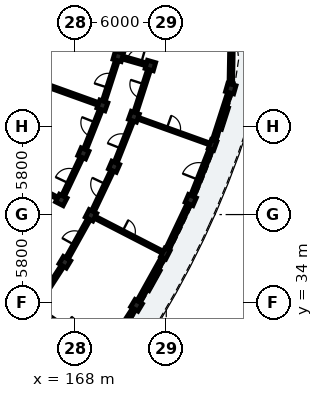
"""IFC4 building model, lengths in metres.
Left out: names, types, materials, properties, quantities, classifications, styles, units other than length and angle.
Written with IfcOpenShell. Run it as: python <this file> out.ifc"""

import sys

from ifc_helpers import new_model, si_unit, direction, frame, frame_2d, origin, origin_2d, place, context, subcontext, project, spatial, rectangle, extrude, element, fill, save


model = new_model("IFC4")
c1 = context("Model", 3, precision=1e-05, world=origin(), true_north=direction((0.0, 1.0)))
c2 = subcontext(c1, "Body", "Model", "MODEL_VIEW")
j1 = project(units=[si_unit("LENGTHUNIT", "METRE"), si_unit("PLANEANGLEUNIT", "RADIAN")], contexts=[c1])
p1 = place(None, origin())
s1 = spatial("IfcSite", under=j1, at=p1, CompositionType="ELEMENT")
p2 = place(p1, origin())
s2 = spatial("IfcBuilding", under=s1, at=p2, CompositionType="ELEMENT")
p3 = place(p2, frame((0.0, 0.0, 15.56)))
s3 = spatial("IfcBuildingStorey", under=s2, at=p3, CompositionType="ELEMENT", Elevation=15.56)
for number, where, z_axis, x_axis in (
    (1, (167.33, 36.662, 0.0), (0.0, 0.0, 1.0), (0.857, -0.515, 0.0)),
    (2, (172.044, 33.83, 0.0), (0.0, 0.0, 1.0), (0.857, -0.515, 0.0)),
    (3, (167.095, 40.759, 0.0), (0.0, 0.0, 1.0), (0.889, -0.458, 0.0)),
    (4, (169.051, 39.752, 0.0), (0.0, 0.0, 1.0), (0.889, -0.458, 0.0)),
):
    element("IfcColumn", number, at=place(p3, frame(where, z_axis=z_axis, x_axis=x_axis)), inside=s3, PredefinedType="COLUMN", context=c2, shape_type="SweptSolid", body=[
        extrude(rectangle(XDim=0.56, YDim=0.56, at=origin_2d()), origin(), (0.0, 0.0, 1.0), 3.11),
    ])
p4 = place(p3, frame((173.941, 37.234, 0.0), z_axis=(0.0, 0.0, 1.0), x_axis=(0.889017141486, -0.457873915117, 0.0)))
e5 = element("IfcColumn", 5, at=p4, inside=s3, PredefinedType="PILASTER", context=c2, shape_type="SweptSolid", body=[
    extrude(rectangle(XDim=0.38, YDim=0.62, at=origin_2d()), origin(), (0.0, 0.0, 1.0), 3.11),
])
for number, where, z_axis, x_axis in (
    (6, (168.55, 43.825, 0.0), (0.0, 0.0, 1.0), (0.917, -0.399, 0.0)),
    (7, (170.567, 42.948, 0.0), (0.0, 0.0, 1.0), (0.917, -0.399, 0.0)),
    (8, (175.611, 40.754, 0.0), (0.0, 0.0, 1.0), (0.917, -0.399, 0.0)),
    (9, (169.8, 46.979, 0.0), (0.0, 0.0, 1.0), (0.941, -0.338, 0.0)),
    (10, (171.871, 46.236, 0.0), (0.0, 0.0, 1.0), (0.941, -0.338, 0.0)),
):
    element("IfcColumn", number, at=place(p3, frame(where, z_axis=z_axis, x_axis=x_axis)), inside=s3, PredefinedType="COLUMN", context=c2, shape_type="SweptSolid", body=[
        extrude(rectangle(XDim=0.56, YDim=0.56, at=origin_2d()), origin(), (0.0, 0.0, 1.0), 3.11),
    ])
p5 = place(p3, frame((177.047, 44.377, 0.0), z_axis=(0.0, 0.0, 1.0), x_axis=(0.941176015256, -0.337916718003, 0.0)))
e11 = element("IfcColumn", 11, at=p5, inside=s3, PredefinedType="PILASTER", context=c2, shape_type="SweptSolid", body=[
    extrude(rectangle(XDim=0.38, YDim=0.62, at=origin_2d()), origin(), (0.0, 0.0, 1.0), 3.11),
])
for number, where, z_axis, x_axis in (
    (12, (170.841, 50.208, 0.0), (0.0, 0.0, 1.0), (0.961, -0.276, 0.0)),
    (13, (172.956, 49.602, 0.0), (0.0, 0.0, 1.0), (0.961, -0.276, 0.0)),
    (14, (178.243, 48.086, 0.0), (0.0, 0.0, 1.0), (0.961, -0.276, 0.0)),
):
    element("IfcColumn", number, at=place(p3, frame(where, z_axis=z_axis, x_axis=x_axis)), inside=s3, PredefinedType="COLUMN", context=c2, shape_type="SweptSolid", body=[
        extrude(rectangle(XDim=0.56, YDim=0.56, at=origin_2d()), origin(), (0.0, 0.0, 1.0), 3.11),
    ])
p6 = place(p3, frame((170.016, 30.691, 0.0), z_axis=(0.0, 0.0, 1.0), x_axis=(0.542833164741, 0.839840553472, 0.0)))
e15 = element("IfcWall", 15, at=p6, inside=s3, PredefinedType="SOLIDWALL", context=c2, shape_type="SweptSolid", body=[
    extrude(rectangle(XDim=3.487, YDim=0.24, at=frame_2d((1.743, 0.0))), origin(), (0.0, 0.0, 1.0), 2.355),
])
p7 = place(p6, frame((1.104, 0.0, 0.55)))
e16 = element("IfcOpeningElement", 16, at=p7, cuts=e15, PredefinedType="OPENING", context=c2, shape_type="SweptSolid", body=[
    extrude(rectangle(XDim=1.28, YDim=1.52, at=frame_2d((0.64, 0.76))), frame((0.0, 0.13, 0.0), z_axis=(0.0, -1.0, 0.0), x_axis=(1.0, 0.0, 0.0)), (0.0, 0.0, 1.0), 0.26),
])
p8 = place(p3, frame((172.166, 34.048, 0.0), z_axis=(0.0, 0.0, 1.0), x_axis=(0.486706738221, 0.87356542455, 0.0)))
e17 = element("IfcWall", 17, at=p8, inside=s3, PredefinedType="SOLIDWALL", context=c2, shape_type="SweptSolid", body=[
    extrude(rectangle(XDim=3.487, YDim=0.24, at=frame_2d((1.743, 0.0))), origin(), (0.0, 0.0, 1.0), 2.355),
])
p9 = place(p8, frame((0.953, 0.0, 0.35)))
e18 = element("IfcOpeningElement", 18, at=p9, cuts=e17, PredefinedType="OPENING", context=c2, shape_type="SweptSolid", body=[
    extrude(rectangle(XDim=1.58, YDim=1.68, at=frame_2d((0.79, 0.84))), frame((0.0, 0.13, 0.0), z_axis=(0.0, -1.0, 0.0), x_axis=(1.0, 0.0, 0.0)), (0.0, 0.0, 1.0), 0.26),
])
p10 = place(p3, frame((174.01, 37.378, 0.0), z_axis=(0.0, 0.0, 1.0), x_axis=(0.428576879122, 0.903505317462, 0.0)))
e19 = element("IfcWall", 19, at=p10, inside=s3, PredefinedType="SOLIDWALL", context=c2, shape_type="SweptSolid", body=[
    extrude(rectangle(XDim=3.487, YDim=0.24, at=frame_2d((1.743, 0.0))), origin(), (0.0, 0.0, 1.0), 2.355),
])
p11 = place(p10, frame((1.123, 0.0, 0.55)))
e20 = element("IfcOpeningElement", 20, at=p11, cuts=e19, PredefinedType="OPENING", context=c2, shape_type="SweptSolid", body=[
    extrude(rectangle(XDim=1.24, YDim=1.535, at=frame_2d((0.62, 0.768))), frame((0.0, 0.13, 0.0), z_axis=(0.0, -1.0, 0.0), x_axis=(1.0, 0.0, 0.0)), (0.0, 0.0, 1.0), 0.26),
])
p12 = place(p3, frame((175.703, 40.987, 0.0), z_axis=(0.0, 0.0, 1.0), x_axis=(0.368503667074, 0.929626294461, 0.0)))
e21 = element("IfcWall", 21, at=p12, inside=s3, PredefinedType="SOLIDWALL", context=c2, shape_type="SweptSolid", body=[
    extrude(rectangle(XDim=3.487, YDim=0.24, at=frame_2d((1.743, 0.0))), origin(), (0.0, 0.0, 1.0), 2.355),
])
p13 = place(p12, frame((1.173, 0.0, 0.0)))
e22 = element("IfcOpeningElement", 22, at=p13, cuts=e21, PredefinedType="OPENING", context=c2, shape_type="SweptSolid", body=[
    extrude(rectangle(XDim=1.14, YDim=2.16, at=frame_2d((0.57, 1.08))), frame((0.0, 0.13, 0.0), z_axis=(0.0, -1.0, 0.0), x_axis=(1.0, 0.0, 0.0)), (0.0, 0.0, 1.0), 0.26),
])
p14 = place(p3, frame((177.096, 44.529, 0.0), z_axis=(0.0, 0.0, 1.0), x_axis=(0.306949591136, 0.951725773793, 0.0)))
e23 = element("IfcWall", 23, at=p14, inside=s3, PredefinedType="SOLIDWALL", context=c2, shape_type="SweptSolid", body=[
    extrude(rectangle(XDim=3.487, YDim=0.24, at=frame_2d((1.743, 0.0))), origin(), (0.0, 0.0, 1.0), 2.355),
])
p15 = place(p14, frame((1.003, 0.0, 0.55)))
e24 = element("IfcOpeningElement", 24, at=p15, cuts=e23, PredefinedType="OPENING", context=c2, shape_type="SweptSolid", body=[
    extrude(rectangle(XDim=1.48, YDim=1.46, at=frame_2d((0.74, 0.73))), frame((0.0, 0.13, 0.0), z_axis=(0.0, -1.0, 0.0), x_axis=(1.0, 0.0, 0.0)), (0.0, 0.0, 1.0), 0.26),
])
p16 = place(p3, frame((178.311, 51.993, 0.0), z_axis=(0.0, 0.0, 1.0), x_axis=(-0.017428315893, -0.999848115368, 0.0)))
e25 = element("IfcWall", 25, at=p16, inside=s3, PredefinedType="SOLIDWALL", context=c2, shape_type="SweptSolid", body=[
    extrude(rectangle(XDim=3.908, YDim=0.24, at=frame_2d((1.954, 0.0))), origin(), (0.0, 0.0, 1.0), 2.355),
])
p17 = place(p3, frame((165.739, 33.464, 0.0), z_axis=(0.0, 0.0, 1.0), x_axis=(0.821638260647, -0.570009270663, 0.0)))
e26 = element("IfcWall", 26, at=p17, inside=s3, PredefinedType="PARTITIONING", context=c2, shape_type="SweptSolid", body=[
    extrude(rectangle(XDim=4.7, YDim=0.125, at=frame_2d((2.35, 0.0))), origin(), (0.0, 0.0, 1.0), 2.37),
])
p18 = place(p17, frame((1.915, 0.0, 0.0)))
e27 = element("IfcOpeningElement", 27, at=p18, cuts=e26, PredefinedType="OPENING", context=c2, shape_type="SweptSolid", body=[
    extrude(rectangle(XDim=0.87, YDim=2.08, at=frame_2d((0.435, 1.04))), frame((0.0, 0.073, 0.0), z_axis=(0.0, -1.0, 0.0), x_axis=(1.0, 0.0, 0.0)), (0.0, 0.0, 1.0), 0.145),
])
p19 = place(p3, frame((165.6, 33.986, 0.0), z_axis=(0.0, 0.0, 1.0), x_axis=(0.542787304957, 0.83987019329, 0.0)))
e28 = element("IfcWall", 28, at=p19, inside=s3, PredefinedType="PARTITIONING", context=c2, shape_type="SweptSolid", body=[
    extrude(rectangle(XDim=2.837, YDim=0.195, at=frame_2d((1.418, 0.0))), origin(), (0.0, 0.0, 1.0), 2.37),
])
p20 = place(p19, frame((0.944, 0.0, 0.0)))
e29 = element("IfcOpeningElement", 29, at=p20, cuts=e28, PredefinedType="OPENING", context=c2, shape_type="SweptSolid", body=[
    extrude(rectangle(XDim=0.95, YDim=2.13, at=frame_2d((0.475, 1.065))), frame((0.0, 0.107, 0.0), z_axis=(0.0, -1.0, 0.0), x_axis=(1.0, 0.0, 0.0)), (0.0, 0.0, 1.0), 0.215),
])
p21 = place(p3, frame((167.5, 36.968, 0.0), z_axis=(0.0, 0.0, 1.0), x_axis=(0.48673124079, 0.8735517725, 0.0)))
e30 = element("IfcWall", 30, at=p21, inside=s3, PredefinedType="PARTITIONING", context=c2, shape_type="SweptSolid", body=[
    extrude(rectangle(XDim=2.837, YDim=0.195, at=frame_2d((1.418, 0.0))), origin(), (0.0, 0.0, 1.0), 2.37),
])
p22 = place(p21, frame((0.954, 0.0, 0.0)))
e31 = element("IfcOpeningElement", 31, at=p22, cuts=e30, PredefinedType="OPENING", context=c2, shape_type="SweptSolid", body=[
    extrude(rectangle(XDim=0.93, YDim=2.12, at=frame_2d((0.465, 1.06))), frame((0.0, 0.107, 0.0), z_axis=(0.0, -1.0, 0.0), x_axis=(1.0, 0.0, 0.0)), (0.0, 0.0, 1.0), 0.215),
])
p23 = place(p3, frame((169.407, 39.569, 0.0), z_axis=(0.0, 0.0, 1.0), x_axis=(0.889013002038, -0.457881952262, 0.0)))
e32 = element("IfcWall", 32, at=p23, inside=s3, PredefinedType="PLUMBINGWALL", context=c2, shape_type="SweptSolid", body=[
    extrude(rectangle(XDim=4.7, YDim=0.15, at=frame_2d((2.35, 0.0))), origin(), (0.0, 0.0, 1.0), 2.37),
])
p24 = place(p23, frame((1.925, 0.0, 0.0)))
e33 = element("IfcOpeningElement", 33, at=p24, cuts=e32, PredefinedType="OPENING", context=c2, shape_type="SweptSolid", body=[
    extrude(rectangle(XDim=0.85, YDim=2.05, at=frame_2d((0.425, 1.025))), frame((0.0, 0.085, 0.0), z_axis=(0.0, -1.0, 0.0), x_axis=(1.0, 0.0, 0.0)), (0.0, 0.0, 1.0), 0.17),
])
p25 = place(p3, frame((160.872, 43.964, 0.0), z_axis=(0.0, 0.0, 1.0), x_axis=(0.889022010753, -0.457864460727, 0.0)))
e34 = element("IfcWall", 34, at=p25, inside=s3, PredefinedType="PARTITIONING", context=c2, shape_type="SweptSolid", body=[
    extrude(rectangle(XDim=6.6, YDim=0.125, at=frame_2d((3.3, 0.0))), origin(), (0.0, 0.0, 1.0), 2.37),
])
p26 = place(p25, frame((2.865, 0.0, 0.0)))
e35 = element("IfcOpeningElement", 35, at=p26, cuts=e34, PredefinedType="OPENING", context=c2, shape_type="SweptSolid", body=[
    extrude(rectangle(XDim=0.87, YDim=2.08, at=frame_2d((0.435, 1.04))), frame((0.0, 0.073, 0.0), z_axis=(0.0, -1.0, 0.0), x_axis=(1.0, 0.0, 0.0)), (0.0, 0.0, 1.0), 0.145),
])
p27 = place(p3, frame((169.201, 40.068, 0.0), z_axis=(0.0, 0.0, 1.0), x_axis=(0.428493237107, 0.903544988229, 0.0)))
e36 = element("IfcWall", 36, at=p27, inside=s3, PredefinedType="PARTITIONING", context=c2, shape_type="SweptSolid", body=[
    extrude(rectangle(XDim=2.837, YDim=0.195, at=frame_2d((1.418, 0.0))), origin(), (0.0, 0.0, 1.0), 2.37),
])
p28 = place(p27, frame((0.924, 0.0, 0.0)))
e37 = element("IfcOpeningElement", 37, at=p28, cuts=e36, PredefinedType="OPENING", context=c2, shape_type="SweptSolid", body=[
    extrude(rectangle(XDim=0.99, YDim=2.16, at=frame_2d((0.495, 1.08))), frame((0.0, 0.107, 0.0), z_axis=(0.0, -1.0, 0.0), x_axis=(1.0, 0.0, 0.0)), (0.0, 0.0, 1.0), 0.215),
])
p29 = place(p3, frame((167.246, 41.075, 0.0), z_axis=(0.0, 0.0, 1.0), x_axis=(0.428550049392, 0.903518043631, 0.0)))
e38 = element("IfcWall", 38, at=p29, inside=s3, PredefinedType="PARTITIONING", context=c2, shape_type="SweptSolid", body=[
    extrude(rectangle(XDim=2.693, YDim=0.195, at=frame_2d((1.346, 0.0))), origin(), (0.0, 0.0, 1.0), 2.37),
])
p30 = place(p29, frame((0.852, 0.0, 0.0)))
e39 = element("IfcOpeningElement", 39, at=p30, cuts=e38, PredefinedType="OPENING", context=c2, shape_type="SweptSolid", body=[
    extrude(rectangle(XDim=0.99, YDim=2.16, at=frame_2d((0.495, 1.08))), frame((0.0, 0.107, 0.0), z_axis=(0.0, -1.0, 0.0), x_axis=(1.0, 0.0, 0.0)), (0.0, 0.0, 1.0), 0.215),
])
p31 = place(p3, frame((170.696, 43.273, 0.0), z_axis=(0.0, 0.0, 1.0), x_axis=(0.368584691693, 0.929594172233, 0.0)))
e40 = element("IfcWall", 40, at=p31, inside=s3, PredefinedType="PARTITIONING", context=c2, shape_type="SweptSolid", body=[
    extrude(rectangle(XDim=2.837, YDim=0.195, at=frame_2d((1.418, 0.0))), origin(), (0.0, 0.0, 1.0), 2.37),
])
p32 = place(p31, frame((0.934, 0.0, 0.0)))
e41 = element("IfcOpeningElement", 41, at=p32, cuts=e40, PredefinedType="OPENING", context=c2, shape_type="SweptSolid", body=[
    extrude(rectangle(XDim=0.97, YDim=2.15, at=frame_2d((0.485, 1.075))), frame((0.0, 0.107, 0.0), z_axis=(0.0, -1.0, 0.0), x_axis=(1.0, 0.0, 0.0)), (0.0, 0.0, 1.0), 0.215),
])
p33 = place(p3, frame((168.678, 44.15, 0.0), z_axis=(0.0, 0.0, 1.0), x_axis=(0.368528468945, 0.929616462622, 0.0)))
e42 = element("IfcWall", 42, at=p33, inside=s3, PredefinedType="PARTITIONING", context=c2, shape_type="SweptSolid", body=[
    extrude(rectangle(XDim=2.693, YDim=0.195, at=frame_2d((1.346, 0.0))), origin(), (0.0, 0.0, 1.0), 2.37),
])
p34 = place(p33, frame((0.862, 0.0, 0.0)))
e43 = element("IfcOpeningElement", 43, at=p34, cuts=e42, PredefinedType="OPENING", context=c2, shape_type="SweptSolid", body=[
    extrude(rectangle(XDim=0.97, YDim=2.15, at=frame_2d((0.485, 1.075))), frame((0.0, 0.107, 0.0), z_axis=(0.0, -1.0, 0.0), x_axis=(1.0, 0.0, 0.0)), (0.0, 0.0, 1.0), 0.215),
])
p35 = place(p3, frame((172.247, 46.1, 0.0), z_axis=(0.0, 0.0, 1.0), x_axis=(0.941182387398, -0.337898969591, 0.0)))
e44 = element("IfcWall", 44, at=p35, inside=s3, PredefinedType="PARTITIONING", context=c2, shape_type="SweptSolid", body=[
    extrude(rectangle(XDim=4.7, YDim=0.125, at=frame_2d((2.35, 0.0))), origin(), (0.0, 0.0, 1.0), 2.37),
])
p36 = place(p35, frame((1.895, 0.0, 0.0)))
e45 = element("IfcOpeningElement", 45, at=p36, cuts=e44, PredefinedType="OPENING", context=c2, shape_type="SweptSolid", body=[
    extrude(rectangle(XDim=0.91, YDim=2.1, at=frame_2d((0.455, 1.05))), frame((0.0, 0.073, 0.0), z_axis=(0.0, -1.0, 0.0), x_axis=(1.0, 0.0, 0.0)), (0.0, 0.0, 1.0), 0.145),
])
p37 = place(p3, frame((163.212, 49.344, 0.0), z_axis=(0.0, 0.0, 1.0), x_axis=(0.941179890997, -0.337905922978, 0.0)))
e46 = element("IfcWall", 46, at=p37, inside=s3, PredefinedType="PARTITIONING", context=c2, shape_type="SweptSolid", body=[
    extrude(rectangle(XDim=6.6, YDim=0.185, at=frame_2d((3.3, 0.0))), origin(), (0.0, 0.0, 1.0), 2.37),
])
p38 = place(p3, frame((171.978, 46.569, 0.0), z_axis=(0.0, 0.0, 1.0), x_axis=(0.30694495224, 0.951727269912, 0.0)))
e47 = element("IfcWall", 47, at=p38, inside=s3, PredefinedType="PARTITIONING", context=c2, shape_type="SweptSolid", body=[
    extrude(rectangle(XDim=2.837, YDim=0.195, at=frame_2d((1.418, 0.0))), origin(), (0.0, 0.0, 1.0), 2.37),
])
p39 = place(p38, frame((0.944, 0.0, 0.0)))
e48 = element("IfcOpeningElement", 48, at=p39, cuts=e47, PredefinedType="OPENING", context=c2, shape_type="SweptSolid", body=[
    extrude(rectangle(XDim=0.95, YDim=2.13, at=frame_2d((0.475, 1.065))), frame((0.0, 0.107, 0.0), z_axis=(0.0, -1.0, 0.0), x_axis=(1.0, 0.0, 0.0)), (0.0, 0.0, 1.0), 0.215),
])
p40 = place(p3, frame((169.907, 47.312, 0.0), z_axis=(0.0, 0.0, 1.0), x_axis=(0.306883578189, 0.951747061691, 0.0)))
e49 = element("IfcWall", 49, at=p40, inside=s3, PredefinedType="PARTITIONING", context=c2, shape_type="SweptSolid", body=[
    extrude(rectangle(XDim=2.693, YDim=0.195, at=frame_2d((1.346, 0.0))), origin(), (0.0, 0.0, 1.0), 2.37),
])
p41 = place(p40, frame((0.872, 0.0, 0.0)))
e50 = element("IfcOpeningElement", 50, at=p41, cuts=e49, PredefinedType="OPENING", context=c2, shape_type="SweptSolid", body=[
    extrude(rectangle(XDim=0.95, YDim=2.13, at=frame_2d((0.475, 1.065))), frame((0.0, 0.107, 0.0), z_axis=(0.0, -1.0, 0.0), x_axis=(1.0, 0.0, 0.0)), (0.0, 0.0, 1.0), 0.215),
])
p42 = place(p3, frame((170.889, 50.194, 0.0), z_axis=(0.0, 0.0, 1.0), x_axis=(0.961264701934, -0.275626872449, 0.0)))
e51 = element("IfcWall", 51, at=p42, inside=s3, PredefinedType="PARTITIONING", context=c2, shape_type="SweptSolid", body=[
    extrude(rectangle(XDim=2.1, YDim=0.195, at=frame_2d((1.05, 0.0))), origin(), (0.0, 0.0, 1.0), 2.37),
])
p43 = place(p42, frame((0.57, 0.0, 0.0)))
e52 = element("IfcOpeningElement", 52, at=p43, cuts=e51, PredefinedType="OPENING", context=c2, shape_type="SweptSolid", body=[
    extrude(rectangle(XDim=0.95, YDim=2.13, at=frame_2d((0.475, 1.065))), frame((0.0, 0.107, 0.0), z_axis=(0.0, -1.0, 0.0), x_axis=(1.0, 0.0, 0.0)), (0.0, 0.0, 1.0), 0.215),
])
p44 = place(p9, origin())
e53 = element("IfcWindow", 53, at=p44, inside=s3, PartitioningType="SINGLE_PANEL", PredefinedType="WINDOW", context=c2, shape_type="SweptSolid", body=[
    extrude(rectangle(XDim=1.58, YDim=1.68, at=frame_2d((0.79, 0.84))), frame((0.0, 0.03, 0.0), z_axis=(0.0, -1.0, 0.0), x_axis=(1.0, 0.0, 0.0)), (0.0, 0.0, 1.0), 0.06),
])
fill(e18, e53)
p45 = place(p11, origin())
e54 = element("IfcWindow", 54, at=p45, inside=s3, PartitioningType="SINGLE_PANEL", PredefinedType="WINDOW", context=c2, shape_type="SweptSolid", body=[
    extrude(rectangle(XDim=1.24, YDim=1.535, at=frame_2d((0.62, 0.768))), frame((0.0, 0.03, 0.0), z_axis=(0.0, -1.0, 0.0), x_axis=(1.0, 0.0, 0.0)), (0.0, 0.0, 1.0), 0.06),
])
fill(e20, e54)
p46 = place(p13, origin())
e55 = element("IfcDoor", 55, at=p46, inside=s3, OperationType="SINGLE_SWING_LEFT", PredefinedType="DOOR", context=c2, shape_type="SweptSolid", body=[
    extrude(rectangle(XDim=1.14, YDim=2.16, at=frame_2d((0.57, 1.08))), frame((0.0, 0.025, 0.0), z_axis=(0.0, -1.0, 0.0), x_axis=(1.0, 0.0, 0.0)), (0.0, 0.0, 1.0), 0.05),
])
fill(e22, e55)
p47 = place(p15, origin())
e56 = element("IfcWindow", 56, at=p47, inside=s3, PartitioningType="SINGLE_PANEL", PredefinedType="WINDOW", context=c2, shape_type="SweptSolid", body=[
    extrude(rectangle(XDim=1.48, YDim=1.46, at=frame_2d((0.74, 0.73))), frame((0.0, 0.03, 0.0), z_axis=(0.0, -1.0, 0.0), x_axis=(1.0, 0.0, 0.0)), (0.0, 0.0, 1.0), 0.06),
])
fill(e24, e56)
p48 = place(p20, origin())
e57 = element("IfcDoor", 57, at=p48, inside=s3, OperationType="SINGLE_SWING_RIGHT", PredefinedType="DOOR", context=c2, shape_type="SweptSolid", body=[
    extrude(rectangle(XDim=0.95, YDim=2.13, at=frame_2d((0.475, 1.065))), frame((0.0, 0.025, 0.0), z_axis=(0.0, -1.0, 0.0), x_axis=(1.0, 0.0, 0.0)), (0.0, 0.0, 1.0), 0.05),
])
fill(e29, e57)
p49 = place(p22, origin())
e58 = element("IfcDoor", 58, at=p49, inside=s3, OperationType="SINGLE_SWING_LEFT", PredefinedType="DOOR", context=c2, shape_type="SweptSolid", body=[
    extrude(rectangle(XDim=0.93, YDim=2.12, at=frame_2d((0.465, 1.06))), frame((0.0, 0.025, 0.0), z_axis=(0.0, -1.0, 0.0), x_axis=(1.0, 0.0, 0.0)), (0.0, 0.0, 1.0), 0.05),
])
fill(e31, e58)
p50 = place(p24, origin())
e59 = element("IfcDoor", 59, at=p50, inside=s3, OperationType="SINGLE_SWING_LEFT", PredefinedType="DOOR", context=c2, shape_type="SweptSolid", body=[
    extrude(rectangle(XDim=0.85, YDim=2.05, at=frame_2d((0.425, 1.025))), frame((0.0, 0.025, 0.0), z_axis=(0.0, -1.0, 0.0), x_axis=(1.0, 0.0, 0.0)), (0.0, 0.0, 1.0), 0.05),
])
fill(e33, e59)
p51 = place(p28, origin())
e60 = element("IfcDoor", 60, at=p51, inside=s3, OperationType="SINGLE_SWING_RIGHT", PredefinedType="DOOR", context=c2, shape_type="SweptSolid", body=[
    extrude(rectangle(XDim=0.99, YDim=2.16, at=frame_2d((0.495, 1.08))), frame((0.0, 0.025, 0.0), z_axis=(0.0, -1.0, 0.0), x_axis=(1.0, 0.0, 0.0)), (0.0, 0.0, 1.0), 0.05),
])
fill(e37, e60)
p52 = place(p30, origin())
e61 = element("IfcDoor", 61, at=p52, inside=s3, OperationType="SINGLE_SWING_LEFT", PredefinedType="DOOR", context=c2, shape_type="SweptSolid", body=[
    extrude(rectangle(XDim=0.99, YDim=2.16, at=frame_2d((0.495, 1.08))), frame((0.0, 0.025, 0.0), z_axis=(0.0, -1.0, 0.0), x_axis=(1.0, 0.0, 0.0)), (0.0, 0.0, 1.0), 0.05),
])
fill(e39, e61)
p53 = place(p32, origin())
e62 = element("IfcDoor", 62, at=p53, inside=s3, OperationType="SINGLE_SWING_LEFT", PredefinedType="DOOR", context=c2, shape_type="SweptSolid", body=[
    extrude(rectangle(XDim=0.97, YDim=2.15, at=frame_2d((0.485, 1.075))), frame((0.0, 0.025, 0.0), z_axis=(0.0, -1.0, 0.0), x_axis=(1.0, 0.0, 0.0)), (0.0, 0.0, 1.0), 0.05),
])
fill(e41, e62)
p54 = place(p34, origin())
e63 = element("IfcDoor", 63, at=p54, inside=s3, OperationType="SINGLE_SWING_RIGHT", PredefinedType="DOOR", context=c2, shape_type="SweptSolid", body=[
    extrude(rectangle(XDim=0.97, YDim=2.15, at=frame_2d((0.485, 1.075))), frame((0.0, 0.025, 0.0), z_axis=(0.0, -1.0, 0.0), x_axis=(1.0, 0.0, 0.0)), (0.0, 0.0, 1.0), 0.05),
])
fill(e43, e63)
p55 = place(p36, origin())
e64 = element("IfcDoor", 64, at=p55, inside=s3, OperationType="SINGLE_SWING_LEFT", PredefinedType="DOOR", context=c2, shape_type="SweptSolid", body=[
    extrude(rectangle(XDim=0.91, YDim=2.1, at=frame_2d((0.455, 1.05))), frame((0.0, 0.025, 0.0), z_axis=(0.0, -1.0, 0.0), x_axis=(1.0, 0.0, 0.0)), (0.0, 0.0, 1.0), 0.05),
])
fill(e45, e64)
p56 = place(p39, origin())
e65 = element("IfcDoor", 65, at=p56, inside=s3, OperationType="SINGLE_SWING_RIGHT", PredefinedType="DOOR", context=c2, shape_type="SweptSolid", body=[
    extrude(rectangle(XDim=0.95, YDim=2.13, at=frame_2d((0.475, 1.065))), frame((0.0, 0.025, 0.0), z_axis=(0.0, -1.0, 0.0), x_axis=(1.0, 0.0, 0.0)), (0.0, 0.0, 1.0), 0.05),
])
fill(e48, e65)
p57 = place(p41, origin())
e66 = element("IfcDoor", 66, at=p57, inside=s3, OperationType="SINGLE_SWING_LEFT", PredefinedType="DOOR", context=c2, shape_type="SweptSolid", body=[
    extrude(rectangle(XDim=0.95, YDim=2.13, at=frame_2d((0.475, 1.065))), frame((0.0, 0.025, 0.0), z_axis=(0.0, -1.0, 0.0), x_axis=(1.0, 0.0, 0.0)), (0.0, 0.0, 1.0), 0.05),
])
fill(e50, e66)
p58 = place(p43, origin())
e67 = element("IfcDoor", 67, at=p58, inside=s3, OperationType="SINGLE_SWING_RIGHT", PredefinedType="DOOR", context=c2, shape_type="SweptSolid", body=[
    extrude(rectangle(XDim=0.95, YDim=2.13, at=frame_2d((0.475, 1.065))), frame((0.0, 0.025, 0.0), z_axis=(0.0, -1.0, 0.0), x_axis=(1.0, 0.0, 0.0)), (0.0, 0.0, 1.0), 0.05),
])
fill(e52, e67)
save(model, sys.argv[1])
